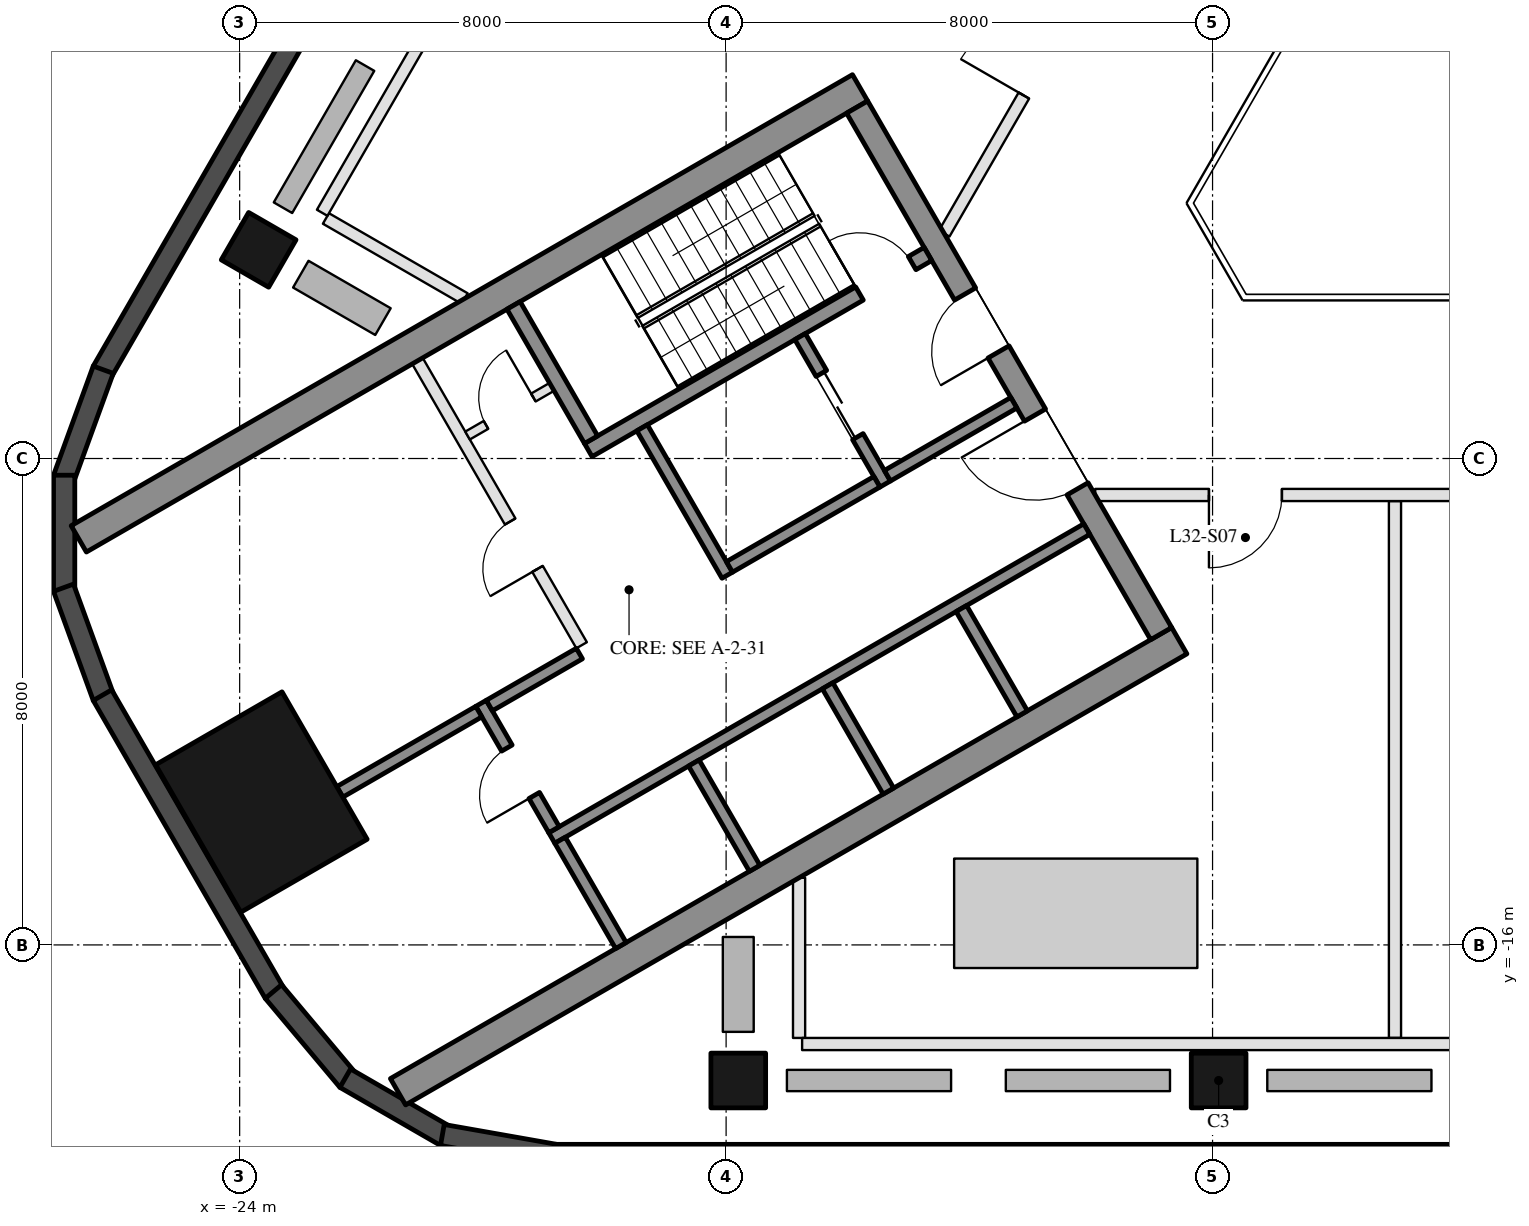
"""IFC4 building model, lengths in metres.
Left out: names, types, materials, properties, quantities, classifications, styles, units other than length and angle.
Written with IfcOpenShell. Run it as: python <this file> out.ifc"""

import sys

from ifc_helpers import new_model, si_unit, direction, frame, frame_2d, origin, origin_2d, place, context, subcontext, project, spatial, rectangle, hollow_rectangle, extrude, element, fill, save


model = new_model("IFC4")
c1 = context("Model", 3, precision=1e-05, world=origin(), true_north=direction((0.0, 1.0)))
c2 = subcontext(c1, "Body", "Model", "MODEL_VIEW")
j1 = project(units=[si_unit("LENGTHUNIT", "METRE"), si_unit("PLANEANGLEUNIT", "RADIAN")], contexts=[c1])
p1 = place(None, origin())
s1 = spatial("IfcSite", under=j1, at=p1, CompositionType="ELEMENT")
p2 = place(p1, origin())
s2 = spatial("IfcBuilding", under=s1, at=p2, CompositionType="ELEMENT")
p3 = place(p2, frame((0.0, 0.0, 137.6)))
s3 = spatial("IfcBuildingStorey", under=s2, at=p3, CompositionType="ELEMENT", Elevation=137.6)
for number, where, z_axis, x_axis in (
    (1, (-15.8, -18.23, 0.0), (0.0, 0.0, 1.0), (-1.0, 0.0, 0.0)),
    (2, (-7.9, -18.23, 0.0), (0.0, 0.0, 1.0), (-1.0, 0.0, 0.0)),
    (3, (-23.688, -4.568, 0.0), (0.0, 0.0, 1.0), (0.5, 0.866, 0.0)),
):
    element("IfcColumn", number, at=place(p3, frame(where, z_axis=z_axis, x_axis=x_axis)), inside=s3, PredefinedType="COLUMN", context=c2, shape_type="SweptSolid", body=[
        extrude(hollow_rectangle(XDim=0.9, YDim=0.9, WallThickness=0.04, at=origin_2d()), origin(), (0.0, 0.0, 1.0), 4.5),
    ])
p4 = place(p3, frame((-23.643, -13.65, 0.0), z_axis=(0.0, 0.0, 1.0), x_axis=(-0.5, 0.866025403784, 0.0)))
e4 = element("IfcColumn", 4, at=p4, inside=s3, PredefinedType="COLUMN", context=c2, shape_type="SweptSolid", body=[
    extrude(hollow_rectangle(XDim=2.8, YDim=2.4, WallThickness=0.07, at=origin_2d()), origin(), (0.0, 0.0, 1.0), 4.5),
])
p5 = place(p3, frame((-7.441, 26.022, 0.0), z_axis=(0.0, 0.0, 1.0), x_axis=(-0.499998380999, -0.866026338513, 0.0)))
e5 = element("IfcWall", 5, at=p5, inside=s3, PredefinedType="SOLIDWALL", context=c2, shape_type="SweptSolid", body=[
    extrude(rectangle(XDim=37.631, YDim=0.35, at=frame_2d((18.816, 0.0))), origin(), (0.0, 0.0, 1.0), 4.2),
])
for number, where, z_axis, x_axis in (
    (6, (-26.244, -6.54, 0.0), (0.0, 0.0, 1.0), (-0.342, -0.94, 0.0)),
    (7, (-26.886, -8.275, 0.0), (0.0, 0.0, 1.0), (0.0, -1.0, 0.0)),
    (8, (-26.897, -10.125, 0.0), (0.0, 0.0, 1.0), (0.342, -0.94, 0.0)),
):
    element("IfcWall", number, at=place(p3, frame(where, z_axis=z_axis, x_axis=x_axis)), inside=s3, PredefinedType="SOLIDWALL", context=c2, shape_type="SweptSolid", body=[
        extrude(rectangle(XDim=1.91, YDim=0.35, at=frame_2d((0.955, 0.0))), origin(), (0.0, 0.0, 1.0), 4.2),
    ])
p6 = place(p3, frame((-26.256, -11.893, 0.0), z_axis=(0.0, 0.0, 1.0), x_axis=(0.499986410639, -0.866033249463, 0.0)))
e9 = element("IfcWall", 9, at=p6, inside=s3, PredefinedType="SOLIDWALL", context=c2, shape_type="SweptSolid", body=[
    extrude(rectangle(XDim=5.658, YDim=0.35, at=frame_2d((2.829, 0.0))), origin(), (0.0, 0.0, 1.0), 4.2),
])
for number, where, z_axis, x_axis in (
    (10, (-23.445, -16.768, 0.0), (0.0, 0.0, 1.0), (0.643, -0.766, 0.0)),
    (11, (-22.264, -18.192, 0.0), (0.0, 0.0, 1.0), (0.866, -0.5, 0.0)),
):
    element("IfcWall", number, at=place(p3, frame(where, z_axis=z_axis, x_axis=x_axis)), inside=s3, PredefinedType="SOLIDWALL", context=c2, shape_type="SweptSolid", body=[
        extrude(rectangle(XDim=1.91, YDim=0.35, at=frame_2d((0.955, 0.0))), origin(), (0.0, 0.0, 1.0), 4.2),
    ])
p7 = place(p3, frame((-20.667, -19.126, 0.0), z_axis=(0.0, 0.0, 1.0), x_axis=(0.984798995425, -0.173697837091, 0.0)))
e12 = element("IfcWall", 12, at=p7, inside=s3, PredefinedType="SOLIDWALL", context=c2, shape_type="SweptSolid", body=[
    extrude(rectangle(XDim=1.91, YDim=0.35, at=frame_2d((0.955, 0.0))), origin(), (0.0, 0.0, 1.0), 4.2),
])
p8 = place(p3, frame((-18.816, -19.455, 0.0), z_axis=(0.0, 0.0, 1.0), x_axis=(1.0, 0.0, 0.0)))
e13 = element("IfcWall", 13, at=p8, inside=s3, PredefinedType="SOLIDWALL", context=c2, shape_type="SweptSolid", body=[
    extrude(rectangle(XDim=37.632, YDim=0.35, at=frame_2d((18.816, 0.0))), origin(), (0.0, 0.0, 1.0), 4.2),
])
for number, where, z_axis, x_axis in (
    (14, (-13.797, -1.903, 0.0), (0.0, 0.0, 1.0), (-0.866, -0.5, 0.0)),
    (15, (-8.547, -10.997, 0.0), (0.0, 0.0, 1.0), (-0.866, -0.5, 0.0)),
):
    element("IfcWall", number, at=place(p3, frame(where, z_axis=z_axis, x_axis=x_axis)), inside=s3, PredefinedType="SHEAR", context=c2, shape_type="SweptSolid", body=[
        extrude(rectangle(XDim=14.837, YDim=0.5, at=frame_2d((7.418, 0.0))), origin(), (0.0, 0.0, 1.0), 4.2),
    ])
p9 = place(p3, frame((-13.845, -2.22, 0.0), z_axis=(0.0, 0.0, 1.0), x_axis=(0.500004234368, -0.866022959057, 0.0)))
e16 = element("IfcWall", 16, at=p9, inside=s3, PredefinedType="SHEAR", context=c2, shape_type="SweptSolid", body=[
    extrude(rectangle(XDim=10.0, YDim=0.4, at=frame_2d((5.0, 0.0))), origin(), (0.0, 0.0, 1.0), 4.2),
])
p10 = place(p9, frame((3.55, 0.0, 0.0)))
e17 = element("IfcOpeningElement", 17, at=p10, cuts=e16, PredefinedType="OPENING", context=c2, shape_type="SweptSolid", body=[
    extrude(rectangle(XDim=1.1, YDim=2.1, at=frame_2d((0.55, 1.05))), frame((0.0, 0.21, 0.0), z_axis=(0.0, -1.0, 0.0), x_axis=(1.0, 0.0, 0.0)), (0.0, 0.0, 1.0), 0.42),
])
p11 = place(p9, frame((5.85, 0.0, 0.0)))
e18 = element("IfcOpeningElement", 18, at=p11, cuts=e16, PredefinedType="OPENING", context=c2, shape_type="SweptSolid", body=[
    extrude(rectangle(XDim=1.4, YDim=2.1, at=frame_2d((0.7, 1.05))), frame((0.0, 0.21, 0.0), z_axis=(0.0, -1.0, 0.0), x_axis=(1.0, 0.0, 0.0)), (0.0, 0.0, 1.0), 0.42),
])
p12 = place(p3, frame((-12.681, -4.636, 0.0), z_axis=(0.0, 0.0, 1.0), x_axis=(-0.866021702275, -0.500006411147, 0.0)))
e19 = element("IfcWall", 19, at=p12, inside=s3, PredefinedType="SHEAR", context=c2, shape_type="SweptSolid", body=[
    extrude(rectangle(XDim=6.45, YDim=0.25, at=frame_2d((3.225, 0.0))), origin(), (0.0, 0.0, 1.0), 4.2),
])
p13 = place(p12, frame((0.3, 0.0, 0.0)))
e20 = element("IfcOpeningElement", 20, at=p13, cuts=e19, PredefinedType="OPENING", context=c2, shape_type="SweptSolid", body=[
    extrude(rectangle(XDim=1.0, YDim=2.1, at=frame_2d((0.5, 1.05))), frame((0.0, 0.135, 0.0), z_axis=(0.0, -1.0, 0.0), x_axis=(1.0, 0.0, 0.0)), (0.0, 0.0, 1.0), 0.27),
])
p14 = place(p3, frame((-19.496, -5.482, 0.0), z_axis=(0.0, 0.0, 1.0), x_axis=(0.499990435942, -0.866030925526, 0.0)))
e21 = element("IfcWall", 21, at=p14, inside=s3, PredefinedType="SHEAR", context=c2, shape_type="SweptSolid", body=[
    extrude(rectangle(XDim=2.55, YDim=0.25, at=frame_2d((1.275, 0.0))), origin(), (0.0, 0.0, 1.0), 4.2),
])
p15 = place(p3, frame((-17.381, -7.495, 0.0), z_axis=(0.0, 0.0, 1.0), x_axis=(0.500011755427, -0.866018616679, 0.0)))
e22 = element("IfcWall", 22, at=p15, inside=s3, PredefinedType="SHEAR", context=c2, shape_type="SweptSolid", body=[
    extrude(rectangle(XDim=2.8, YDim=0.2, at=frame_2d((1.4, 0.0))), origin(), (0.0, 0.0, 1.0), 4.2),
])
p16 = place(p3, frame((-14.783, -5.995, 0.0), z_axis=(0.0, 0.0, 1.0), x_axis=(0.49994636267, -0.866056369097, 0.0)))
e23 = element("IfcWall", 23, at=p16, inside=s3, PredefinedType="SHEAR", context=c2, shape_type="SweptSolid", body=[
    extrude(rectangle(XDim=2.8, YDim=0.2, at=frame_2d((1.4, 0.0))), origin(), (0.0, 0.0, 1.0), 4.2),
])
p17 = place(p16, frame((0.7, 0.0, 0.0)))
e24 = element("IfcOpeningElement", 24, at=p17, cuts=e23, PredefinedType="OPENING", context=c2, shape_type="SweptSolid", body=[
    extrude(rectangle(XDim=1.2, YDim=2.1, at=frame_2d((0.6, 1.05))), frame((0.0, 0.11, 0.0), z_axis=(0.0, -1.0, 0.0), x_axis=(1.0, 0.0, 0.0)), (0.0, 0.0, 1.0), 0.22),
])
p18 = place(p3, frame((-13.52, -8.383, 0.0), z_axis=(0.0, 0.0, 1.0), x_axis=(-0.866034573852, -0.49998411664, 0.0)))
e25 = element("IfcWall", 25, at=p18, inside=s3, PredefinedType="SHEAR", context=c2, shape_type="SweptSolid", body=[
    extrude(rectangle(XDim=2.8, YDim=0.2, at=frame_2d((1.4, 0.0))), origin(), (0.0, 0.0, 1.0), 4.2),
])
p19 = place(p3, frame((-11.268, -7.083, 0.0), z_axis=(0.0, 0.0, 1.0), x_axis=(-0.866050077142, -0.499957262057, 0.0)))
e26 = element("IfcWall", 26, at=p19, inside=s3, PredefinedType="SHEAR", context=c2, shape_type="SweptSolid", body=[
    extrude(rectangle(XDim=2.4, YDim=0.2, at=frame_2d((1.2, 0.0))), origin(), (0.0, 0.0, 1.0), 4.2),
])
p20 = place(p3, frame((-10.068, -9.162, 0.0), z_axis=(0.0, 0.0, 1.0), x_axis=(-0.866032725843, -0.499987317609, 0.0)))
e27 = element("IfcWall", 27, at=p20, inside=s3, PredefinedType="SHEAR", context=c2, shape_type="SweptSolid", body=[
    extrude(rectangle(XDim=10.16, YDim=0.2, at=frame_2d((5.08, 0.0))), origin(), (0.0, 0.0, 1.0), 4.2),
])
p21 = place(p3, frame((-20.031, -12.026, 0.0), z_axis=(0.0, 0.0, 1.0), x_axis=(0.500033551112, -0.866006032174, 0.0)))
e28 = element("IfcWall", 28, at=p21, inside=s3, PredefinedType="SHEAR", context=c2, shape_type="SweptSolid", body=[
    extrude(rectangle(XDim=2.4, YDim=0.2, at=frame_2d((1.2, 0.0))), origin(), (0.0, 0.0, 1.0), 4.2),
])
p22 = place(p21, frame((0.85, 0.0, 0.0)))
e29 = element("IfcOpeningElement", 29, at=p22, cuts=e28, PredefinedType="OPENING", context=c2, shape_type="SweptSolid", body=[
    extrude(rectangle(XDim=0.9, YDim=2.1, at=frame_2d((0.45, 1.05))), frame((0.0, 0.11, 0.0), z_axis=(0.0, -1.0, 0.0), x_axis=(1.0, 0.0, 0.0)), (0.0, 0.0, 1.0), 0.22),
])
p23 = place(p3, frame((-18.413, -11.208, 0.0), z_axis=(0.0, 0.0, 1.0), x_axis=(-0.866038183914, -0.499977863513, 0.0)))
e30 = element("IfcWall", 30, at=p23, inside=s3, PredefinedType="SHEAR", context=c2, shape_type="SweptSolid", body=[
    extrude(rectangle(XDim=1.71, YDim=0.2, at=frame_2d((0.855, 0.0))), origin(), (0.0, 0.0, 1.0), 4.2),
])
for number, where, z_axis, x_axis in (
    (31, (-12.131, -10.468, 0.0), (0.0, 0.0, 1.0), (0.5, -0.866, 0.0)),
    (32, (-14.331, -11.738, 0.0), (0.0, 0.0, 1.0), (0.5, -0.866, 0.0)),
    (33, (-16.531, -13.008, 0.0), (0.0, 0.0, 1.0), (0.5, -0.866, 0.0)),
    (34, (-18.73, -14.278, 0.0), (0.0, 0.0, 1.0), (0.5, -0.866, 0.0)),
):
    element("IfcWall", number, at=place(p3, frame(where, z_axis=z_axis, x_axis=x_axis)), inside=s3, PredefinedType="SHEAR", context=c2, shape_type="SweptSolid", body=[
        extrude(rectangle(XDim=2.0, YDim=0.2, at=frame_2d((1.0, 0.0))), origin(), (0.0, 0.0, 1.0), 4.2),
    ])
p24 = place(p3, frame((-20.067, -12.163, 0.0), z_axis=(0.0, 0.0, 1.0), x_axis=(-0.866060851709, -0.499938597367, 0.0)))
e35 = element("IfcWall", 35, at=p24, inside=s3, PredefinedType="SHEAR", context=c2, shape_type="SweptSolid", body=[
    extrude(rectangle(XDim=2.64, YDim=0.2, at=frame_2d((1.32, 0.0))), origin(), (0.0, 0.0, 1.0), 4.2),
])
p25 = place(p3, frame((-21.076, -6.395, 0.0), z_axis=(0.0, 0.0, 1.0), x_axis=(0.50001468107, -0.866016927499, 0.0)))
e36 = element("IfcWall", 36, at=p25, inside=s3, PredefinedType="PARTITIONING", context=c2, shape_type="SweptSolid", body=[
    extrude(rectangle(XDim=5.4, YDim=0.2, at=frame_2d((2.7, 0.0))), origin(), (0.0, 0.0, 1.0), 4.2),
])
p26 = place(p25, frame((3.05, 0.0, 0.0)))
e37 = element("IfcOpeningElement", 37, at=p26, cuts=e36, PredefinedType="OPENING", context=c2, shape_type="SweptSolid", body=[
    extrude(rectangle(XDim=0.9, YDim=2.1, at=frame_2d((0.45, 1.05))), frame((0.0, 0.11, 0.0), z_axis=(0.0, -1.0, 0.0), x_axis=(1.0, 0.0, 0.0)), (0.0, 0.0, 1.0), 0.22),
])
p27 = place(p3, frame((-18.866, -6.822, 0.0), z_axis=(0.0, 0.0, 1.0), x_axis=(-0.866028054938, -0.499995408039, 0.0)))
e38 = element("IfcWall", 38, at=p27, inside=s3, PredefinedType="PARTITIONING", context=c2, shape_type="SweptSolid", body=[
    extrude(rectangle(XDim=1.6, YDim=0.15, at=frame_2d((0.8, 0.0))), origin(), (0.0, 0.0, 1.0), 4.2),
])
p28 = place(p27, frame((0.35, 0.0, 0.0)))
e39 = element("IfcOpeningElement", 39, at=p28, cuts=e38, PredefinedType="OPENING", context=c2, shape_type="SweptSolid", body=[
    extrude(rectangle(XDim=0.9, YDim=2.1, at=frame_2d((0.45, 1.05))), frame((0.0, 0.085, 0.0), z_axis=(0.0, -1.0, 0.0), x_axis=(1.0, 0.0, 0.0)), (0.0, 0.0, 1.0), 0.17),
])
p29 = place(p3, frame((-14.8, -17.53, 0.0), z_axis=(0.0, 0.0, 1.0), x_axis=(0.0, 1.0, 0.0)))
e40 = element("IfcWall", 40, at=p29, inside=s3, PredefinedType="PARTITIONING", context=c2, shape_type="SweptSolid", body=[
    extrude(rectangle(XDim=2.635, YDim=0.2, at=frame_2d((1.317, 0.0))), origin(), (0.0, 0.0, 1.0), 4.2),
])
p30 = place(p3, frame((-5.0, -17.53, 0.0), z_axis=(0.0, 0.0, 1.0), x_axis=(0.0, 1.0, 0.0)))
e41 = element("IfcWall", 41, at=p30, inside=s3, PredefinedType="PARTITIONING", context=c2, shape_type="SweptSolid", body=[
    extrude(rectangle(XDim=8.83, YDim=0.2, at=frame_2d((4.415, 0.0))), origin(), (0.0, 0.0, 1.0), 4.2),
])
p31 = place(p3, frame((-14.75, -17.63, 0.0), z_axis=(0.0, 0.0, 1.0), x_axis=(1.0, 0.0, 0.0)))
e42 = element("IfcWall", 42, at=p31, inside=s3, PredefinedType="PARTITIONING", context=c2, shape_type="SweptSolid", body=[
    extrude(rectangle(XDim=29.5, YDim=0.2, at=frame_2d((14.75, 0.0))), origin(), (0.0, 0.0, 1.0), 3.41),
])
p32 = place(p3, frame((-9.93, -8.6, 0.0), z_axis=(0.0, 0.0, 1.0), x_axis=(1.0, 0.0, 0.0)))
e43 = element("IfcWall", 43, at=p32, inside=s3, PredefinedType="PARTITIONING", context=c2, shape_type="SweptSolid", body=[
    extrude(rectangle(XDim=19.861, YDim=0.2, at=frame_2d((9.93, 0.0))), origin(), (0.0, 0.0, 1.0), 3.41),
])
p33 = place(p32, frame((1.871, 0.0, 0.0)))
e44 = element("IfcOpeningElement", 44, at=p33, cuts=e43, PredefinedType="OPENING", context=c2, shape_type="SweptSolid", body=[
    extrude(rectangle(XDim=1.2, YDim=2.1, at=frame_2d((0.6, 1.05))), frame((0.0, 0.11, 0.0), z_axis=(0.0, -1.0, 0.0), x_axis=(1.0, 0.0, 0.0)), (0.0, 0.0, 1.0), 0.22),
])
p34 = place(p32, frame((7.831, 0.0, 0.0)))
e45 = element("IfcOpeningElement", 45, at=p34, cuts=e43, PredefinedType="OPENING", context=c2, shape_type="SweptSolid", body=[
    extrude(rectangle(XDim=1.2, YDim=2.1, at=frame_2d((0.6, 1.05))), frame((0.0, 0.11, 0.0), z_axis=(0.0, -1.0, 0.0), x_axis=(1.0, 0.0, 0.0)), (0.0, 0.0, 1.0), 0.22),
])
p35 = place(p32, frame((15.29, 0.0, 0.0)))
e46 = element("IfcOpeningElement", 46, at=p35, cuts=e43, PredefinedType="OPENING", context=c2, shape_type="SweptSolid", body=[
    extrude(rectangle(XDim=1.2, YDim=2.1, at=frame_2d((0.6, 1.05))), frame((0.0, 0.11, 0.0), z_axis=(0.0, -1.0, 0.0), x_axis=(1.0, 0.0, 0.0)), (0.0, 0.0, 1.0), 0.22),
])
p36 = place(p3, frame((-22.581, -4.052, 0.0), z_axis=(0.0, 0.0, 1.0), x_axis=(0.866038977738, -0.499976488486, 0.0)))
e47 = element("IfcWall", 47, at=p36, inside=s3, PredefinedType="PARTITIONING", context=c2, shape_type="SweptSolid", body=[
    extrude(rectangle(XDim=2.635, YDim=0.2, at=frame_2d((1.317, 0.0))), origin(), (0.0, 0.0, 1.0), 4.2),
])
p37 = place(p3, frame((-7.893, 21.589, 0.0), z_axis=(0.0, 0.0, 1.0), x_axis=(-0.499998500593, -0.866026269466, 0.0)))
e48 = element("IfcWall", 48, at=p37, inside=s3, PredefinedType="PARTITIONING", context=c2, shape_type="SweptSolid", body=[
    extrude(rectangle(XDim=29.5, YDim=0.2, at=frame_2d((14.75, 0.0))), origin(), (0.0, 0.0, 1.0), 3.41),
])
p38 = place(p3, frame((-2.482, 12.9, 0.0), z_axis=(0.0, 0.0, 1.0), x_axis=(-0.50000478328, -0.866022642139, 0.0)))
e49 = element("IfcWall", 49, at=p38, inside=s3, PredefinedType="PARTITIONING", context=c2, shape_type="SweptSolid", body=[
    extrude(rectangle(XDim=19.861, YDim=0.2, at=frame_2d((9.931, 0.0))), origin(), (0.0, 0.0, 1.0), 3.41),
])
p39 = place(p38, frame((2.621, 0.0, 0.0)))
e50 = element("IfcOpeningElement", 50, at=p39, cuts=e49, PredefinedType="OPENING", context=c2, shape_type="SweptSolid", body=[
    extrude(rectangle(XDim=1.2, YDim=2.1, at=frame_2d((0.6, 1.05))), frame((0.0, 0.11, 0.0), z_axis=(0.0, -1.0, 0.0), x_axis=(1.0, 0.0, 0.0)), (0.0, 0.0, 1.0), 0.22),
])
p40 = place(p38, frame((9.331, 0.0, 0.0)))
e51 = element("IfcOpeningElement", 51, at=p40, cuts=e49, PredefinedType="OPENING", context=c2, shape_type="SweptSolid", body=[
    extrude(rectangle(XDim=1.2, YDim=2.1, at=frame_2d((0.6, 1.05))), frame((0.0, 0.11, 0.0), z_axis=(0.0, -1.0, 0.0), x_axis=(1.0, 0.0, 0.0)), (0.0, 0.0, 1.0), 0.22),
])
p41 = place(p38, frame((16.04, 0.0, 0.0)))
e52 = element("IfcOpeningElement", 52, at=p41, cuts=e49, PredefinedType="OPENING", context=c2, shape_type="SweptSolid", body=[
    extrude(rectangle(XDim=1.2, YDim=2.1, at=frame_2d((0.6, 1.05))), frame((0.0, 0.11, 0.0), z_axis=(0.0, -1.0, 0.0), x_axis=(1.0, 0.0, 0.0)), (0.0, 0.0, 1.0), 0.22),
])
p42 = place(p17, origin())
e53 = element("IfcDoor", 53, at=p42, inside=s3, OperationType="DOUBLE_DOOR_SLIDING", PredefinedType="DOOR", context=c2, shape_type="SweptSolid", body=[
    extrude(rectangle(XDim=1.2, YDim=2.1, at=frame_2d((0.6, 1.05))), frame((0.0, 0.025, 0.0), z_axis=(0.0, -1.0, 0.0), x_axis=(1.0, 0.0, 0.0)), (0.0, 0.0, 1.0), 0.05),
])
fill(e24, e53)
p43 = place(p28, frame((0.9, 0.0, 0.0), z_axis=(0.0, 0.0, 1.0), x_axis=(-1.0, 0.0, 0.0)))
e54 = element("IfcDoor", 54, at=p43, inside=s3, OperationType="SINGLE_SWING_RIGHT", PredefinedType="DOOR", context=c2, shape_type="SweptSolid", body=[
    extrude(rectangle(XDim=0.9, YDim=2.1, at=frame_2d((0.45, 1.05))), frame((0.0, 0.025, 0.0), z_axis=(0.0, -1.0, 0.0), x_axis=(1.0, 0.0, 0.0)), (0.0, 0.0, 1.0), 0.05),
])
fill(e39, e54)
p44 = place(p22, frame((0.9, 0.0, 0.0), z_axis=(0.0, 0.0, 1.0), x_axis=(-1.0, 0.0, 0.0)))
e55 = element("IfcDoor", 55, at=p44, inside=s3, OperationType="SINGLE_SWING_LEFT", PredefinedType="DOOR", context=c2, shape_type="SweptSolid", body=[
    extrude(rectangle(XDim=0.9, YDim=2.1, at=frame_2d((0.45, 1.05))), frame((0.0, 0.025, 0.0), z_axis=(0.0, -1.0, 0.0), x_axis=(1.0, 0.0, 0.0)), (0.0, 0.0, 1.0), 0.05),
])
fill(e29, e55)
p45 = place(p26, frame((0.9, 0.0, 0.0), z_axis=(0.0, 0.0, 1.0), x_axis=(-1.0, 0.0, 0.0)))
e56 = element("IfcDoor", 56, at=p45, inside=s3, OperationType="SINGLE_SWING_LEFT", PredefinedType="DOOR", context=c2, shape_type="SweptSolid", body=[
    extrude(rectangle(XDim=0.9, YDim=2.1, at=frame_2d((0.45, 1.05))), frame((0.0, 0.025, 0.0), z_axis=(0.0, -1.0, 0.0), x_axis=(1.0, 0.0, 0.0)), (0.0, 0.0, 1.0), 0.05),
])
fill(e37, e56)
p46 = place(p10, frame((1.1, 0.0, 0.0), z_axis=(0.0, 0.0, 1.0), x_axis=(-1.0, 0.0, 0.0)))
e57 = element("IfcDoor", 57, at=p46, inside=s3, OperationType="SINGLE_SWING_LEFT", PredefinedType="DOOR", context=c2, shape_type="SweptSolid", body=[
    extrude(rectangle(XDim=1.1, YDim=2.1, at=frame_2d((0.55, 1.05))), frame((0.0, 0.025, 0.0), z_axis=(0.0, -1.0, 0.0), x_axis=(1.0, 0.0, 0.0)), (0.0, 0.0, 1.0), 0.05),
])
fill(e17, e57)
p47 = place(p11, frame((1.4, 0.0, 0.0), z_axis=(0.0, 0.0, 1.0), x_axis=(-1.0, 0.0, 0.0)))
e58 = element("IfcDoor", 58, at=p47, inside=s3, OperationType="DOUBLE_DOOR_SINGLE_SWING", PredefinedType="DOOR", context=c2, shape_type="SweptSolid", body=[
    extrude(rectangle(XDim=1.4, YDim=2.1, at=frame_2d((0.7, 1.05))), frame((0.0, 0.025, 0.0), z_axis=(0.0, -1.0, 0.0), x_axis=(1.0, 0.0, 0.0)), (0.0, 0.0, 1.0), 0.05),
])
fill(e18, e58)
p48 = place(p13, frame((1.0, 0.0, 0.0), z_axis=(0.0, 0.0, 1.0), x_axis=(-1.0, 0.0, 0.0)))
e59 = element("IfcDoor", 59, at=p48, inside=s3, OperationType="SINGLE_SWING_LEFT", PredefinedType="DOOR", context=c2, shape_type="SweptSolid", body=[
    extrude(rectangle(XDim=1.0, YDim=2.1, at=frame_2d((0.5, 1.05))), frame((0.0, 0.025, 0.0), z_axis=(0.0, -1.0, 0.0), x_axis=(1.0, 0.0, 0.0)), (0.0, 0.0, 1.0), 0.05),
])
fill(e20, e59)
p49 = place(p41, frame((1.2, 0.0, 0.0), z_axis=(0.0, 0.0, 1.0), x_axis=(-1.0, 0.0, 0.0)))
e60 = element("IfcDoor", 60, at=p49, inside=s3, OperationType="SINGLE_SWING_LEFT", PredefinedType="DOOR", context=c2, shape_type="SweptSolid", body=[
    extrude(rectangle(XDim=1.2, YDim=2.1, at=frame_2d((0.6, 1.05))), frame((0.0, 0.025, 0.0), z_axis=(0.0, -1.0, 0.0), x_axis=(1.0, 0.0, 0.0)), (0.0, 0.0, 1.0), 0.05),
])
fill(e52, e60)
p50 = place(p33, frame((1.2, 0.0, 0.0), z_axis=(0.0, 0.0, 1.0), x_axis=(-1.0, 0.0, 0.0)))
e61 = element("IfcDoor", 61, at=p50, inside=s3, OperationType="SINGLE_SWING_RIGHT", PredefinedType="DOOR", context=c2, shape_type="SweptSolid", body=[
    extrude(rectangle(XDim=1.2, YDim=2.1, at=frame_2d((0.6, 1.05))), frame((0.0, 0.025, 0.0), z_axis=(0.0, -1.0, 0.0), x_axis=(1.0, 0.0, 0.0)), (0.0, 0.0, 1.0), 0.05),
])
fill(e44, e61)
save(model, sys.argv[1])
